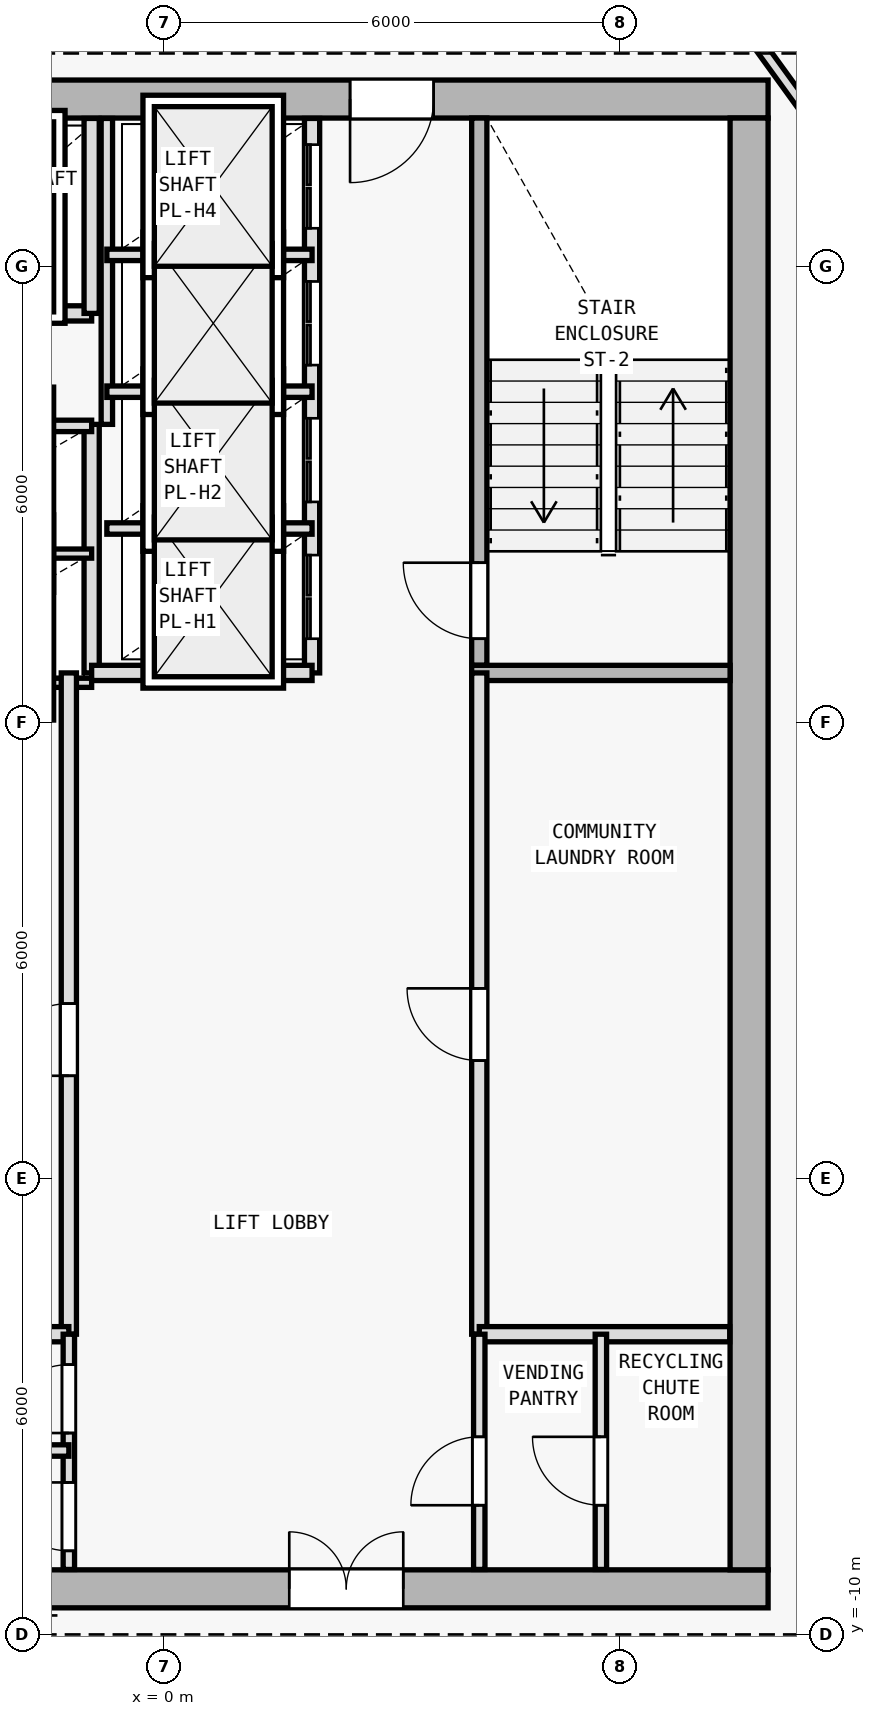
"""IFC4 building model, lengths in metres.
Left out: names, types, materials, properties, quantities, classifications, styles, units other than length and angle.
Written with IfcOpenShell. Run it as: python <this file> out.ifc"""

import sys

from ifc_helpers import new_model, si_unit, direction, frame, frame_2d, origin, origin_2d, place, context, subcontext, project, spatial, rectangle, i_section, extrude, element, fill, save


model = new_model("IFC4")
c1 = context("Model", 3, precision=1e-05, world=origin(), true_north=direction((0.0, 1.0)))
c2 = subcontext(c1, "Body", "Model", "MODEL_VIEW")
j1 = project(units=[si_unit("LENGTHUNIT", "METRE"), si_unit("PLANEANGLEUNIT", "RADIAN")], contexts=[c1])
p1 = place(None, origin())
s1 = spatial("IfcSite", under=j1, at=p1, CompositionType="ELEMENT")
p2 = place(p1, origin())
s2 = spatial("IfcBuilding", under=s1, at=p2, CompositionType="ELEMENT")
p3 = place(p2, frame((0.0, 0.0, 237.9)))
s3 = spatial("IfcBuildingStorey", under=s2, at=p3, CompositionType="ELEMENT", Elevation=237.9)
for number, where, z_axis, x_axis in (
    (1, (7.7, -9.4, 0.0), (0.0, 0.0, 1.0), (1.0, 0.0, 0.0)),
    (2, (7.7, 10.2, 0.0), (0.0, 0.0, 1.0), (1.0, 0.0, 0.0)),
    (3, (0.0, -9.4, 0.0), (0.0, 0.0, 1.0), (1.0, 0.0, 0.0)),
    (4, (7.7, 0.4, 0.0), (0.0, 0.0, 1.0), (1.0, 0.0, 0.0)),
):
    element("IfcColumn", number, at=place(p3, frame(where, z_axis=z_axis, x_axis=x_axis)), inside=s3, PredefinedType="COLUMN", context=c2, shape_type="SweptSolid", body=[
        extrude(i_section(OverallWidth=0.398, OverallDepth=0.387, WebThickness=0.013, FlangeThickness=0.022, FilletRadius=0.015, at=origin_2d()), origin(), (0.0, 0.0, 1.0), 3.6),
    ])
p4 = place(p3, frame((-7.95, -9.4, 0.0), z_axis=(0.0, 0.0, 1.0), x_axis=(1.0, 0.0, 0.0)))
e5 = element("IfcWall", 5, at=p4, inside=s3, PredefinedType="SHEAR", context=c2, shape_type="SweptSolid", body=[
    extrude(rectangle(XDim=15.9, YDim=0.5, at=frame_2d((7.95, 0.0))), origin(), (0.0, 0.0, 1.0), 3.28),
])
p5 = place(p4, frame((9.6, 0.0, 0.0)))
e6 = element("IfcOpeningElement", 6, at=p5, cuts=e5, PredefinedType="OPENING", context=c2, shape_type="SweptSolid", body=[
    extrude(rectangle(XDim=1.5, YDim=2.2, at=frame_2d((0.75, 1.1))), frame((0.0, 0.26, 0.0), z_axis=(0.0, -1.0, 0.0), x_axis=(1.0, 0.0, 0.0)), (0.0, 0.0, 1.0), 0.52),
])
p6 = place(p3, frame((7.95, 10.2, 0.0), z_axis=(0.0, 0.0, 1.0), x_axis=(-1.0, 0.0, 0.0)))
e7 = element("IfcWall", 7, at=p6, inside=s3, PredefinedType="SHEAR", context=c2, shape_type="SweptSolid", body=[
    extrude(rectangle(XDim=15.9, YDim=0.5, at=frame_2d((7.95, 0.0))), origin(), (0.0, 0.0, 1.0), 3.28),
])
p7 = place(p6, frame((4.4, 0.0, 0.0)))
e8 = element("IfcOpeningElement", 8, at=p7, cuts=e7, PredefinedType="OPENING", context=c2, shape_type="SweptSolid", body=[
    extrude(rectangle(XDim=1.1, YDim=2.15, at=frame_2d((0.55, 1.075))), frame((0.0, 0.26, 0.0), z_axis=(0.0, -1.0, 0.0), x_axis=(1.0, 0.0, 0.0)), (0.0, 0.0, 1.0), 0.52),
])
p8 = place(p3, frame((7.7, 9.95, 0.0), z_axis=(0.0, 0.0, 1.0), x_axis=(0.0, -1.0, 0.0)))
e9 = element("IfcWall", 9, at=p8, inside=s3, PredefinedType="SHEAR", context=c2, shape_type="SweptSolid", body=[
    extrude(rectangle(XDim=19.1, YDim=0.5, at=frame_2d((9.55, 0.0))), origin(), (0.0, 0.0, 1.0), 3.28),
])
p9 = place(p3, frame((4.15, 2.75, 0.0), z_axis=(0.0, 0.0, 1.0), x_axis=(0.0, 1.0, 0.0)))
e10 = element("IfcWall", 10, at=p9, inside=s3, PredefinedType="SOLIDWALL", context=c2, shape_type="SweptSolid", body=[
    extrude(rectangle(XDim=7.2, YDim=0.2, at=frame_2d((3.6, 0.0))), origin(), (0.0, 0.0, 1.0), 3.28),
])
p10 = place(p9, frame((0.35, 0.0, 0.0)))
e11 = element("IfcOpeningElement", 11, at=p10, cuts=e10, PredefinedType="OPENING", context=c2, shape_type="SweptSolid", body=[
    extrude(rectangle(XDim=1.0, YDim=2.15, at=frame_2d((0.5, 1.075))), frame((0.0, 0.11, 0.0), z_axis=(0.0, -1.0, 0.0), x_axis=(1.0, 0.0, 0.0)), (0.0, 0.0, 1.0), 0.22),
])
p11 = place(p3, frame((4.05, 2.65, 0.0), z_axis=(0.0, 0.0, 1.0), x_axis=(1.0, 0.0, 0.0)))
e12 = element("IfcWall", 12, at=p11, inside=s3, PredefinedType="SOLIDWALL", context=c2, shape_type="SweptSolid", body=[
    extrude(rectangle(XDim=3.4, YDim=0.2, at=frame_2d((1.7, 0.0))), origin(), (0.0, 0.0, 1.0), 3.28),
])
p12 = place(p3, frame((-0.95, 2.65, 0.0), z_axis=(0.0, 0.0, 1.0), x_axis=(0.0, 1.0, 0.0)))
e13 = element("IfcWall", 13, at=p12, inside=s3, PredefinedType="SOLIDWALL", context=c2, shape_type="SweptSolid", body=[
    extrude(rectangle(XDim=3.27, YDim=0.2, at=frame_2d((1.635, 0.0))), origin(), (0.0, 0.0, 1.0), 3.28),
])
for number, where, z_axis, x_axis in (
    (14, (-3.85, 2.52, 0.0), (0.0, 0.0, 1.0), (1.0, 0.0, 0.0)),
    (15, (-3.85, 4.22, 0.0), (0.0, 0.0, 1.0), (1.0, 0.0, 0.0)),
):
    element("IfcWall", number, at=place(p3, frame(where, z_axis=z_axis, x_axis=x_axis)), inside=s3, PredefinedType="PARTITIONING", context=c2, shape_type="SweptSolid", body=[
        extrude(rectangle(XDim=2.9, YDim=0.12, at=frame_2d((1.45, 0.0))), origin(), (0.0, 0.0, 1.0), 3.28),
    ])
p13 = place(p3, frame((-3.85, 5.9, 0.0), z_axis=(0.0, 0.0, 1.0), x_axis=(1.0, 0.0, 0.0)))
e16 = element("IfcWall", 16, at=p13, inside=s3, PredefinedType="PARTITIONING", context=c2, shape_type="SweptSolid", body=[
    extrude(rectangle(XDim=2.9, YDim=0.15, at=frame_2d((1.45, 0.0))), origin(), (0.0, 0.0, 1.0), 3.28),
])
p14 = place(p3, frame((-3.85, 7.38, 0.0), z_axis=(0.0, 0.0, 1.0), x_axis=(1.0, 0.0, 0.0)))
e17 = element("IfcWall", 17, at=p14, inside=s3, PredefinedType="SOLIDWALL", context=c2, shape_type="SweptSolid", body=[
    extrude(rectangle(XDim=2.9, YDim=0.2, at=frame_2d((1.45, 0.0))), origin(), (0.0, 0.0, 1.0), 3.28),
])
p15 = place(p14, frame((0.85, 0.0, 0.0)))
e18 = element("IfcOpeningElement", 18, at=p15, cuts=e17, PredefinedType="OPENING", context=c2, shape_type="SweptSolid", body=[
    extrude(rectangle(XDim=1.2, YDim=2.2, at=frame_2d((0.6, 1.1))), frame((0.0, 0.11, 0.0), z_axis=(0.0, -1.0, 0.0), x_axis=(1.0, 0.0, 0.0)), (0.0, 0.0, 1.0), 0.22),
])
p16 = place(p3, frame((-0.95, 7.38, 0.0), z_axis=(0.0, 0.0, 1.0), x_axis=(0.0, 1.0, 0.0)))
e19 = element("IfcWall", 19, at=p16, inside=s3, PredefinedType="SOLIDWALL", context=c2, shape_type="SweptSolid", body=[
    extrude(rectangle(XDim=2.565, YDim=0.2, at=frame_2d((1.283, 0.0))), origin(), (0.0, 0.0, 1.0), 3.28),
])
p17 = place(p3, frame((4.15, -6.05, 0.0), z_axis=(0.0, 0.0, 1.0), x_axis=(0.0, 1.0, 0.0)))
e20 = element("IfcWall", 20, at=p17, inside=s3, PredefinedType="SOLIDWALL", context=c2, shape_type="SweptSolid", body=[
    extrude(rectangle(XDim=8.7, YDim=0.2, at=frame_2d((4.35, 0.0))), origin(), (0.0, 0.0, 1.0), 3.28),
])
p18 = place(p17, frame((3.6, 0.0, 0.0)))
e21 = element("IfcOpeningElement", 21, at=p18, cuts=e20, PredefinedType="OPENING", context=c2, shape_type="SweptSolid", body=[
    extrude(rectangle(XDim=0.95, YDim=2.1, at=frame_2d((0.475, 1.05))), frame((0.0, 0.11, 0.0), z_axis=(0.0, -1.0, 0.0), x_axis=(1.0, 0.0, 0.0)), (0.0, 0.0, 1.0), 0.22),
])
p19 = place(p3, frame((-1.25, -6.05, 0.0), z_axis=(0.0, 0.0, 1.0), x_axis=(0.0, 1.0, 0.0)))
e22 = element("IfcWall", 22, at=p19, inside=s3, PredefinedType="SOLIDWALL", context=c2, shape_type="SweptSolid", body=[
    extrude(rectangle(XDim=8.7, YDim=0.2, at=frame_2d((4.35, 0.0))), origin(), (0.0, 0.0, 1.0), 3.28),
])
p20 = place(p19, frame((3.4, 0.0, 0.0)))
e23 = element("IfcOpeningElement", 23, at=p20, cuts=e22, PredefinedType="OPENING", context=c2, shape_type="SweptSolid", body=[
    extrude(rectangle(XDim=0.95, YDim=2.1, at=frame_2d((0.475, 1.05))), frame((0.0, 0.11, 0.0), z_axis=(0.0, -1.0, 0.0), x_axis=(1.0, 0.0, 0.0)), (0.0, 0.0, 1.0), 0.22),
])
p21 = place(p3, frame((1.95, 2.65, 0.0), z_axis=(0.0, 0.0, 1.0), x_axis=(0.0, 1.0, 0.0)))
e24 = element("IfcWall", 24, at=p21, inside=s3, PredefinedType="SOLIDWALL", context=c2, shape_type="SweptSolid", body=[
    extrude(rectangle(XDim=7.295, YDim=0.2, at=frame_2d((3.647, 0.0))), origin(), (0.0, 0.0, 1.0), 3.28),
])
p22 = place(p21, frame((0.45, 0.0, 0.0)))
e25 = element("IfcOpeningElement", 25, at=p22, cuts=e24, PredefinedType="OPENING", context=c2, shape_type="SweptSolid", body=[
    extrude(rectangle(XDim=1.1, YDim=2.15, at=frame_2d((0.55, 1.075))), frame((0.0, 0.11, 0.0), z_axis=(0.0, -1.0, 0.0), x_axis=(1.0, 0.0, 0.0)), (0.0, 0.0, 1.0), 0.22),
])
p23 = place(p21, frame((2.25, 0.0, 0.0)))
e26 = element("IfcOpeningElement", 26, at=p23, cuts=e24, PredefinedType="OPENING", context=c2, shape_type="SweptSolid", body=[
    extrude(rectangle(XDim=1.1, YDim=2.15, at=frame_2d((0.55, 1.075))), frame((0.0, 0.11, 0.0), z_axis=(0.0, -1.0, 0.0), x_axis=(1.0, 0.0, 0.0)), (0.0, 0.0, 1.0), 0.22),
])
p24 = place(p21, frame((4.05, 0.0, 0.0)))
e27 = element("IfcOpeningElement", 27, at=p24, cuts=e24, PredefinedType="OPENING", context=c2, shape_type="SweptSolid", body=[
    extrude(rectangle(XDim=1.1, YDim=2.15, at=frame_2d((0.55, 1.075))), frame((0.0, 0.11, 0.0), z_axis=(0.0, -1.0, 0.0), x_axis=(1.0, 0.0, 0.0)), (0.0, 0.0, 1.0), 0.22),
])
p25 = place(p21, frame((5.85, 0.0, 0.0)))
e28 = element("IfcOpeningElement", 28, at=p25, cuts=e24, PredefinedType="OPENING", context=c2, shape_type="SweptSolid", body=[
    extrude(rectangle(XDim=1.1, YDim=2.15, at=frame_2d((0.55, 1.075))), frame((0.0, 0.11, 0.0), z_axis=(0.0, -1.0, 0.0), x_axis=(1.0, 0.0, 0.0)), (0.0, 0.0, 1.0), 0.22),
])
p26 = place(p3, frame((-0.95, 2.65, 0.0), z_axis=(0.0, 0.0, 1.0), x_axis=(1.0, 0.0, 0.0)))
e29 = element("IfcWall", 29, at=p26, inside=s3, PredefinedType="SOLIDWALL", context=c2, shape_type="SweptSolid", body=[
    extrude(rectangle(XDim=2.9, YDim=0.2, at=frame_2d((1.45, 0.0))), origin(), (0.0, 0.0, 1.0), 3.28),
])
p27 = place(p3, frame((-0.75, 5.92, 0.0), z_axis=(0.0, 0.0, 1.0), x_axis=(0.0, 1.0, 0.0)))
e30 = element("IfcWall", 30, at=p27, inside=s3, PredefinedType="PARTITIONING", context=c2, shape_type="SweptSolid", body=[
    extrude(rectangle(XDim=4.025, YDim=0.15, at=frame_2d((2.013, 0.0))), origin(), (0.0, 0.0, 1.0), 3.28),
])
for number, where, z_axis, x_axis in (
    (31, (-0.75, 4.55, 0.0), (0.0, 0.0, 1.0), (1.0, 0.0, 0.0)),
    (32, (-0.75, 6.35, 0.0), (0.0, 0.0, 1.0), (1.0, 0.0, 0.0)),
    (33, (-0.75, 8.15, 0.0), (0.0, 0.0, 1.0), (1.0, 0.0, 0.0)),
):
    element("IfcWall", number, at=place(p3, frame(where, z_axis=z_axis, x_axis=x_axis)), inside=s3, PredefinedType="PARTITIONING", context=c2, shape_type="SweptSolid", body=[
        extrude(rectangle(XDim=2.7, YDim=0.15, at=frame_2d((1.35, 0.0))), origin(), (0.0, 0.0, 1.0), 3.28),
    ])
p28 = place(p3, frame((-4.04, -6.05, 0.0), z_axis=(0.0, 0.0, 1.0), x_axis=(1.0, 0.0, 0.0)))
e34 = element("IfcWall", 34, at=p28, inside=s3, PredefinedType="SOLIDWALL", context=c2, shape_type="SweptSolid", body=[
    extrude(rectangle(XDim=2.79, YDim=0.2, at=frame_2d((1.395, 0.0))), origin(), (0.0, 0.0, 1.0), 3.28),
])
p29 = place(p3, frame((4.15, -6.05, 0.0), z_axis=(0.0, 0.0, 1.0), x_axis=(1.0, 0.0, 0.0)))
e35 = element("IfcWall", 35, at=p29, inside=s3, PredefinedType="SOLIDWALL", context=c2, shape_type="SweptSolid", body=[
    extrude(rectangle(XDim=3.295, YDim=0.2, at=frame_2d((1.647, 0.0))), origin(), (0.0, 0.0, 1.0), 3.28),
])
p30 = place(p3, frame((-1.25, -9.145, 0.0), z_axis=(0.0, 0.0, 1.0), x_axis=(0.0, 1.0, 0.0)))
e36 = element("IfcWall", 36, at=p30, inside=s3, PredefinedType="PARTITIONING", context=c2, shape_type="SweptSolid", body=[
    extrude(rectangle(XDim=3.095, YDim=0.15, at=frame_2d((1.547, 0.0))), origin(), (0.0, 0.0, 1.0), 3.28),
])
p31 = place(p30, frame((1.795, 0.0, 0.0)))
e37 = element("IfcOpeningElement", 37, at=p31, cuts=e36, PredefinedType="OPENING", context=c2, shape_type="SweptSolid", body=[
    extrude(rectangle(XDim=0.9, YDim=2.1, at=frame_2d((0.45, 1.05))), frame((0.0, 0.085, 0.0), z_axis=(0.0, -1.0, 0.0), x_axis=(1.0, 0.0, 0.0)), (0.0, 0.0, 1.0), 0.17),
])
p32 = place(p30, frame((0.245, 0.0, 0.0)))
e38 = element("IfcOpeningElement", 38, at=p32, cuts=e36, PredefinedType="OPENING", context=c2, shape_type="SweptSolid", body=[
    extrude(rectangle(XDim=0.9, YDim=2.1, at=frame_2d((0.45, 1.05))), frame((0.0, 0.085, 0.0), z_axis=(0.0, -1.0, 0.0), x_axis=(1.0, 0.0, 0.0)), (0.0, 0.0, 1.0), 0.17),
])
p33 = place(p3, frame((4.15, -9.145, 0.0), z_axis=(0.0, 0.0, 1.0), x_axis=(0.0, 1.0, 0.0)))
e39 = element("IfcWall", 39, at=p33, inside=s3, PredefinedType="PARTITIONING", context=c2, shape_type="SweptSolid", body=[
    extrude(rectangle(XDim=3.095, YDim=0.15, at=frame_2d((1.547, 0.0))), origin(), (0.0, 0.0, 1.0), 3.28),
])
p34 = place(p33, frame((0.845, 0.0, 0.0)))
e40 = element("IfcOpeningElement", 40, at=p34, cuts=e39, PredefinedType="OPENING", context=c2, shape_type="SweptSolid", body=[
    extrude(rectangle(XDim=0.9, YDim=2.1, at=frame_2d((0.45, 1.05))), frame((0.0, 0.085, 0.0), z_axis=(0.0, -1.0, 0.0), x_axis=(1.0, 0.0, 0.0)), (0.0, 0.0, 1.0), 0.17),
])
p35 = place(p3, frame((-7.445, -7.58, 0.0), z_axis=(0.0, 0.0, 1.0), x_axis=(1.0, 0.0, 0.0)))
e41 = element("IfcWall", 41, at=p35, inside=s3, PredefinedType="PARTITIONING", context=c2, shape_type="SweptSolid", body=[
    extrude(rectangle(XDim=6.195, YDim=0.15, at=frame_2d((3.098, 0.0))), origin(), (0.0, 0.0, 1.0), 3.28),
])
p36 = place(p3, frame((5.75, -9.145, 0.0), z_axis=(0.0, 0.0, 1.0), x_axis=(0.0, 1.0, 0.0)))
e42 = element("IfcWall", 42, at=p36, inside=s3, PredefinedType="PARTITIONING", context=c2, shape_type="SweptSolid", body=[
    extrude(rectangle(XDim=3.095, YDim=0.15, at=frame_2d((1.547, 0.0))), origin(), (0.0, 0.0, 1.0), 3.28),
])
p37 = place(p36, frame((0.845, 0.0, 0.0)))
e43 = element("IfcOpeningElement", 43, at=p37, cuts=e42, PredefinedType="OPENING", context=c2, shape_type="SweptSolid", body=[
    extrude(rectangle(XDim=0.9, YDim=2.1, at=frame_2d((0.45, 1.05))), frame((0.0, 0.085, 0.0), z_axis=(0.0, -1.0, 0.0), x_axis=(1.0, 0.0, 0.0)), (0.0, 0.0, 1.0), 0.17),
])
p38 = place(p3, frame((6.841, 12.28, 0.0), z_axis=(0.0, 0.0, 1.0), x_axis=(0.586956386413, -0.809618552436, 0.0)))
e44 = element("IfcWall", 44, at=p38, inside=s3, PredefinedType="PARTITIONING", context=c2, shape_type="SweptSolid", body=[
    extrude(rectangle(XDim=5.008, YDim=0.15, at=frame_2d((2.504, 0.0))), origin(), (0.0, 0.0, 1.0), 2.935),
])
p39 = place(p5, origin())
e45 = element("IfcDoor", 45, at=p39, inside=s3, OperationType="DOUBLE_DOOR_SINGLE_SWING", PredefinedType="DOOR", context=c2, shape_type="SweptSolid", body=[
    extrude(rectangle(XDim=1.5, YDim=2.2, at=frame_2d((0.75, 1.1))), frame((0.0, 0.025, 0.0), z_axis=(0.0, -1.0, 0.0), x_axis=(1.0, 0.0, 0.0)), (0.0, 0.0, 1.0), 0.05),
])
fill(e6, e45)
p40 = place(p7, origin())
e46 = element("IfcDoor", 46, at=p40, inside=s3, OperationType="SINGLE_SWING_RIGHT", PredefinedType="DOOR", context=c2, shape_type="SweptSolid", body=[
    extrude(rectangle(XDim=1.1, YDim=2.15, at=frame_2d((0.55, 1.075))), frame((0.0, 0.025, 0.0), z_axis=(0.0, -1.0, 0.0), x_axis=(1.0, 0.0, 0.0)), (0.0, 0.0, 1.0), 0.05),
])
fill(e8, e46)
p41 = place(p10, origin())
e47 = element("IfcDoor", 47, at=p41, inside=s3, OperationType="SINGLE_SWING_RIGHT", PredefinedType="DOOR", context=c2, shape_type="SweptSolid", body=[
    extrude(rectangle(XDim=1.0, YDim=2.15, at=frame_2d((0.5, 1.075))), frame((0.0, 0.025, 0.0), z_axis=(0.0, -1.0, 0.0), x_axis=(1.0, 0.0, 0.0)), (0.0, 0.0, 1.0), 0.05),
])
fill(e11, e47)
p42 = place(p18, origin())
e48 = element("IfcDoor", 48, at=p42, inside=s3, OperationType="SINGLE_SWING_RIGHT", PredefinedType="DOOR", context=c2, shape_type="SweptSolid", body=[
    extrude(rectangle(XDim=0.95, YDim=2.1, at=frame_2d((0.475, 1.05))), frame((0.0, 0.025, 0.0), z_axis=(0.0, -1.0, 0.0), x_axis=(1.0, 0.0, 0.0)), (0.0, 0.0, 1.0), 0.05),
])
fill(e21, e48)
p43 = place(p20, origin())
e49 = element("IfcDoor", 49, at=p43, inside=s3, OperationType="SINGLE_SWING_LEFT", PredefinedType="DOOR", context=c2, shape_type="SweptSolid", body=[
    extrude(rectangle(XDim=0.95, YDim=2.1, at=frame_2d((0.475, 1.05))), frame((0.0, 0.025, 0.0), z_axis=(0.0, -1.0, 0.0), x_axis=(1.0, 0.0, 0.0)), (0.0, 0.0, 1.0), 0.05),
])
fill(e23, e49)
p44 = place(p22, origin())
e50 = element("IfcDoor", 50, at=p44, inside=s3, OperationType="DOUBLE_DOOR_SLIDING", PredefinedType="DOOR", context=c2, shape_type="SweptSolid", body=[
    extrude(rectangle(XDim=1.1, YDim=2.15, at=frame_2d((0.55, 1.075))), frame((0.0, 0.025, 0.0), z_axis=(0.0, -1.0, 0.0), x_axis=(1.0, 0.0, 0.0)), (0.0, 0.0, 1.0), 0.05),
])
fill(e25, e50)
p45 = place(p23, origin())
e51 = element("IfcDoor", 51, at=p45, inside=s3, OperationType="DOUBLE_DOOR_SLIDING", PredefinedType="DOOR", context=c2, shape_type="SweptSolid", body=[
    extrude(rectangle(XDim=1.1, YDim=2.15, at=frame_2d((0.55, 1.075))), frame((0.0, 0.025, 0.0), z_axis=(0.0, -1.0, 0.0), x_axis=(1.0, 0.0, 0.0)), (0.0, 0.0, 1.0), 0.05),
])
fill(e26, e51)
p46 = place(p24, origin())
e52 = element("IfcDoor", 52, at=p46, inside=s3, OperationType="DOUBLE_DOOR_SLIDING", PredefinedType="DOOR", context=c2, shape_type="SweptSolid", body=[
    extrude(rectangle(XDim=1.1, YDim=2.15, at=frame_2d((0.55, 1.075))), frame((0.0, 0.025, 0.0), z_axis=(0.0, -1.0, 0.0), x_axis=(1.0, 0.0, 0.0)), (0.0, 0.0, 1.0), 0.05),
])
fill(e27, e52)
p47 = place(p25, origin())
e53 = element("IfcDoor", 53, at=p47, inside=s3, OperationType="DOUBLE_DOOR_SLIDING", PredefinedType="DOOR", context=c2, shape_type="SweptSolid", body=[
    extrude(rectangle(XDim=1.1, YDim=2.15, at=frame_2d((0.55, 1.075))), frame((0.0, 0.025, 0.0), z_axis=(0.0, -1.0, 0.0), x_axis=(1.0, 0.0, 0.0)), (0.0, 0.0, 1.0), 0.05),
])
fill(e28, e53)
p48 = place(p31, origin())
e54 = element("IfcDoor", 54, at=p48, inside=s3, OperationType="SINGLE_SWING_LEFT", PredefinedType="DOOR", context=c2, shape_type="SweptSolid", body=[
    extrude(rectangle(XDim=0.9, YDim=2.1, at=frame_2d((0.45, 1.05))), frame((0.0, 0.025, 0.0), z_axis=(0.0, -1.0, 0.0), x_axis=(1.0, 0.0, 0.0)), (0.0, 0.0, 1.0), 0.05),
])
fill(e37, e54)
p49 = place(p32, origin())
e55 = element("IfcDoor", 55, at=p49, inside=s3, OperationType="SINGLE_SWING_RIGHT", PredefinedType="DOOR", context=c2, shape_type="SweptSolid", body=[
    extrude(rectangle(XDim=0.9, YDim=2.1, at=frame_2d((0.45, 1.05))), frame((0.0, 0.025, 0.0), z_axis=(0.0, -1.0, 0.0), x_axis=(1.0, 0.0, 0.0)), (0.0, 0.0, 1.0), 0.05),
])
fill(e38, e55)
p50 = place(p34, origin())
e56 = element("IfcDoor", 56, at=p50, inside=s3, OperationType="SINGLE_SWING_LEFT", PredefinedType="DOOR", context=c2, shape_type="SweptSolid", body=[
    extrude(rectangle(XDim=0.9, YDim=2.1, at=frame_2d((0.45, 1.05))), frame((0.0, 0.025, 0.0), z_axis=(0.0, -1.0, 0.0), x_axis=(1.0, 0.0, 0.0)), (0.0, 0.0, 1.0), 0.05),
])
fill(e40, e56)
p51 = place(p37, origin())
e57 = element("IfcDoor", 57, at=p51, inside=s3, OperationType="SINGLE_SWING_RIGHT", PredefinedType="DOOR", context=c2, shape_type="SweptSolid", body=[
    extrude(rectangle(XDim=0.9, YDim=2.1, at=frame_2d((0.45, 1.05))), frame((0.0, 0.025, 0.0), z_axis=(0.0, -1.0, 0.0), x_axis=(1.0, 0.0, 0.0)), (0.0, 0.0, 1.0), 0.05),
])
fill(e43, e57)
save(model, sys.argv[1])
